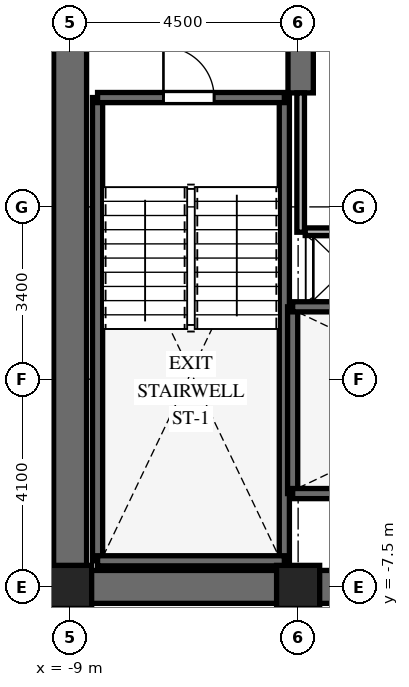
"""IFC4 building model, lengths in metres.
Left out: names, types, materials, properties, quantities, classifications, styles, units other than length and angle.
Written with IfcOpenShell. Run it as: python <this file> out.ifc"""

import sys

from ifc_helpers import new_model, si_unit, direction, frame, frame_2d, origin, origin_2d, place, context, subcontext, project, spatial, rectangle, extrude, element, fill, save


model = new_model("IFC4")
c1 = context("Model", 3, precision=1e-05, world=origin(), true_north=direction((0.0, 1.0)))
c2 = subcontext(c1, "Body", "Model", "MODEL_VIEW")
j1 = project(units=[si_unit("LENGTHUNIT", "METRE"), si_unit("PLANEANGLEUNIT", "RADIAN")], contexts=[c1])
p1 = place(None, origin())
s1 = spatial("IfcSite", under=j1, at=p1, CompositionType="ELEMENT")
p2 = place(p1, origin())
s2 = spatial("IfcBuilding", under=s1, at=p2, CompositionType="ELEMENT")
p3 = place(p2, frame((0.0, 0.0, 284.7)))
s3 = spatial("IfcBuildingStorey", under=s2, at=p3, CompositionType="ELEMENT", Elevation=284.7)
p4 = place(p3, frame((-9.325, -7.5, 0.0), z_axis=(0.0, 0.0, 1.0), x_axis=(1.0, 0.0, 0.0)))
e1 = element("IfcWall", 1, at=p4, inside=s3, PredefinedType="SHEAR", context=c2, shape_type="SweptSolid", body=[
    extrude(rectangle(XDim=18.65, YDim=0.65, at=frame_2d((9.325, 0.0))), origin(), (0.0, 0.0, 1.0), 3.9),
])
p5 = place(p4, frame((9.375, 0.0, 0.0)))
e2 = element("IfcOpeningElement", 2, at=p5, cuts=e1, PredefinedType="OPENING", context=c2, shape_type="SweptSolid", body=[
    extrude(rectangle(XDim=1.0, YDim=2.15, at=frame_2d((0.5, 1.075))), frame((0.0, 0.335, 0.0), z_axis=(0.0, -1.0, 0.0), x_axis=(1.0, 0.0, 0.0)), (0.0, 0.0, 1.0), 0.67),
])
p6 = place(p3, frame((-9.0, -7.175, 0.0), z_axis=(0.0, 0.0, 1.0), x_axis=(0.0, 1.0, 0.0)))
e3 = element("IfcWall", 3, at=p6, inside=s3, PredefinedType="SHEAR", context=c2, shape_type="SweptSolid", body=[
    extrude(rectangle(XDim=14.35, YDim=0.65, at=frame_2d((7.175, 0.0))), origin(), (0.0, 0.0, 1.0), 3.9),
])
p7 = place(p6, frame((10.3, 0.0, 0.0)))
e4 = element("IfcOpeningElement", 4, at=p7, cuts=e3, PredefinedType="OPENING", context=c2, shape_type="SweptSolid", body=[
    extrude(rectangle(XDim=1.05, YDim=2.15, at=frame_2d((0.525, 1.075))), frame((0.0, 0.335, 0.0), z_axis=(0.0, -1.0, 0.0), x_axis=(1.0, 0.0, 0.0)), (0.0, 0.0, 1.0), 0.67),
])
p8 = place(p3, frame((-4.45, 2.25, 0.0), z_axis=(0.0, 0.0, 1.0), x_axis=(0.0, 1.0, 0.0)))
e5 = element("IfcWall", 5, at=p8, inside=s3, PredefinedType="SHEAR", context=c2, shape_type="SweptSolid", body=[
    extrude(rectangle(XDim=4.925, YDim=0.5, at=frame_2d((2.462, 0.0))), origin(), (0.0, 0.0, 1.0), 3.9),
])
for number, where, z_axis, x_axis in (
    (6, (-8.458, -6.985, 0.0), (0.0, 0.0, 1.0), (0.0, 1.0, 0.0)),
    (7, (-4.772, -6.985, 0.0), (0.0, 0.0, 1.0), (0.0, 1.0, 0.0)),
):
    element("IfcWall", number, at=place(p3, frame(where, z_axis=z_axis, x_axis=x_axis)), inside=s3, PredefinedType="SHEAR", context=c2, shape_type="SweptSolid", body=[
        extrude(rectangle(XDim=9.143, YDim=0.2, at=frame_2d((4.572, 0.0))), origin(), (0.0, 0.0, 1.0), 3.9),
    ])
p9 = place(p3, frame((-8.458, -6.985, 0.0), z_axis=(0.0, 0.0, 1.0), x_axis=(1.0, 0.0, 0.0)))
e8 = element("IfcWall", 8, at=p9, inside=s3, PredefinedType="SHEAR", context=c2, shape_type="SweptSolid", body=[
    extrude(rectangle(XDim=3.686, YDim=0.2, at=frame_2d((1.843, 0.0))), origin(), (0.0, 0.0, 1.0), 3.9),
])
p10 = place(p3, frame((-8.458, 2.158, 0.0), z_axis=(0.0, 0.0, 1.0), x_axis=(1.0, 0.0, 0.0)))
e9 = element("IfcWall", 9, at=p10, inside=s3, PredefinedType="SHEAR", context=c2, shape_type="SweptSolid", body=[
    extrude(rectangle(XDim=3.686, YDim=0.2, at=frame_2d((1.843, 0.0))), origin(), (0.0, 0.0, 1.0), 3.9),
])
p11 = place(p10, frame((1.3, 0.0, 0.0)))
e10 = element("IfcOpeningElement", 10, at=p11, cuts=e9, PredefinedType="OPENING", context=c2, shape_type="SweptSolid", body=[
    extrude(rectangle(XDim=1.0, YDim=2.15, at=frame_2d((0.5, 1.075))), frame((0.0, 0.11, 0.0), z_axis=(0.0, -1.0, 0.0), x_axis=(1.0, 0.0, 0.0)), (0.0, 0.0, 1.0), 0.22),
])
p12 = place(p3, frame((-4.608, -5.658, 0.0), z_axis=(0.0, 0.0, 1.0), x_axis=(0.0, 1.0, 0.0)))
e11 = element("IfcWall", 11, at=p12, inside=s3, PredefinedType="SHEAR", context=c2, shape_type="SweptSolid", body=[
    extrude(rectangle(XDim=3.686, YDim=0.2, at=frame_2d((1.843, 0.0))), origin(), (0.0, 0.0, 1.0), 3.9),
])
p13 = place(p3, frame((-4.608, -5.658, 0.0), z_axis=(0.0, 0.0, 1.0), x_axis=(1.0, 0.0, 0.0)))
e12 = element("IfcWall", 12, at=p13, inside=s3, PredefinedType="SHEAR", context=c2, shape_type="SweptSolid", body=[
    extrude(rectangle(XDim=9.166, YDim=0.2, at=frame_2d((4.583, 0.0))), origin(), (0.0, 0.0, 1.0), 3.9),
])
p14 = place(p13, frame((7.45, 0.0, 0.0)))
e13 = element("IfcOpeningElement", 13, at=p14, cuts=e12, PredefinedType="OPENING", context=c2, shape_type="SweptSolid", body=[
    extrude(rectangle(XDim=1.0, YDim=2.15, at=frame_2d((0.5, 1.075))), frame((0.0, 0.11, 0.0), z_axis=(0.0, -1.0, 0.0), x_axis=(1.0, 0.0, 0.0)), (0.0, 0.0, 1.0), 0.22),
])
p15 = place(p3, frame((-4.608, -1.972, 0.0), z_axis=(0.0, 0.0, 1.0), x_axis=(1.0, 0.0, 0.0)))
e14 = element("IfcWall", 14, at=p15, inside=s3, PredefinedType="SHEAR", context=c2, shape_type="SweptSolid", body=[
    extrude(rectangle(XDim=9.166, YDim=0.2, at=frame_2d((4.583, 0.0))), origin(), (0.0, 0.0, 1.0), 3.9),
])
for number, where, z_axis, x_axis in (
    (15, (-9.0, -7.5, 0.0), (0.0, 0.0, 1.0), (1.0, 0.0, 0.0)),
    (16, (-4.5, -7.5, 0.0), (0.0, 0.0, 1.0), (1.0, 0.0, 0.0)),
):
    element("IfcColumn", number, at=place(p3, frame(where, z_axis=z_axis, x_axis=x_axis)), inside=s3, PredefinedType="COLUMN", context=c2, shape_type="SweptSolid", body=[
        extrude(rectangle(XDim=0.85, YDim=0.85, at=origin_2d()), origin(), (0.0, 0.0, 1.0), 3.9),
    ])
p16 = place(p3, frame((-4.45, -0.5, 0.0), z_axis=(0.0, 0.0, 1.0), x_axis=(0.0, 1.0, 0.0)))
e17 = element("IfcWall", 17, at=p16, inside=s3, PredefinedType="PARTITIONING", context=c2, shape_type="SweptSolid", body=[
    extrude(rectangle(XDim=2.75, YDim=0.15, at=frame_2d((1.375, 0.0))), origin(), (0.0, 0.0, 1.0), 3.58),
])
p17 = place(p3, frame((-4.36, -0.49, 0.0), z_axis=(0.0, 0.0, 1.0), x_axis=(1.0, 0.0, 0.0)))
e18 = element("IfcWall", 18, at=p17, inside=s3, PredefinedType="PARTITIONING", context=c2, shape_type="SweptSolid", body=[
    extrude(rectangle(XDim=8.72, YDim=0.15, at=frame_2d((4.36, 0.0))), origin(), (0.0, 0.0, 1.0), 3.58),
])
p18 = place(p17, frame((3.16, 0.0, 0.0)))
e19 = element("IfcOpeningElement", 19, at=p18, cuts=e18, PredefinedType="OPENING", context=c2, shape_type="SweptSolid", body=[
    extrude(rectangle(XDim=0.85, YDim=2.03, at=frame_2d((0.425, 1.015))), frame((0.0, 0.085, 0.0), z_axis=(0.0, -1.0, 0.0), x_axis=(1.0, 0.0, 0.0)), (0.0, 0.0, 1.0), 0.17),
])
p19 = place(p17, frame((5.21, 0.0, 0.0)))
e20 = element("IfcOpeningElement", 20, at=p19, cuts=e18, PredefinedType="OPENING", context=c2, shape_type="SweptSolid", body=[
    extrude(rectangle(XDim=0.85, YDim=2.03, at=frame_2d((0.425, 1.015))), frame((0.0, 0.085, 0.0), z_axis=(0.0, -1.0, 0.0), x_axis=(1.0, 0.0, 0.0)), (0.0, 0.0, 1.0), 0.17),
])
p20 = place(p11, origin())
e21 = element("IfcDoor", 21, at=p20, inside=s3, OperationType="SINGLE_SWING_LEFT", PredefinedType="DOOR", context=c2, shape_type="SweptSolid", body=[
    extrude(rectangle(XDim=1.0, YDim=2.15, at=frame_2d((0.5, 1.075))), frame((0.0, 0.025, 0.0), z_axis=(0.0, -1.0, 0.0), x_axis=(1.0, 0.0, 0.0)), (0.0, 0.0, 1.0), 0.05),
])
fill(e10, e21)
save(model, sys.argv[1])
